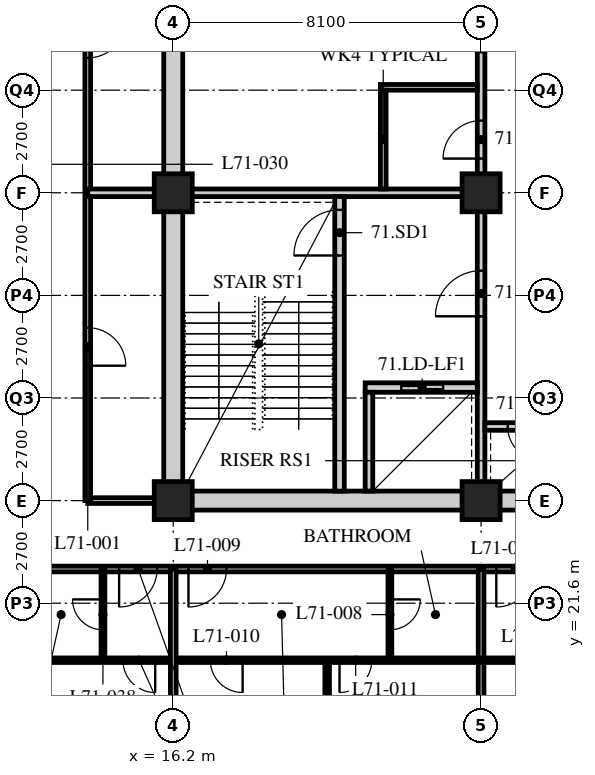
"""IFC4 building model, lengths in metres.
Left out: names, types, materials, properties, quantities, classifications, styles, units other than length and angle.
Written with IfcOpenShell. Run it as: python <this file> out.ifc"""

import sys

from ifc_helpers import new_model, si_unit, direction, frame, frame_2d, origin, origin_2d, place, context, subcontext, project, spatial, rectangle, hollow_rectangle, extrude, element, fill, save


model = new_model("IFC4")
c1 = context("Model", 3, precision=1e-05, world=origin(), true_north=direction((0.0, 1.0)))
c2 = subcontext(c1, "Body", "Model", "MODEL_VIEW")
j1 = project(units=[si_unit("LENGTHUNIT", "METRE"), si_unit("PLANEANGLEUNIT", "RADIAN")], contexts=[c1])
p1 = place(None, origin())
s1 = spatial("IfcSite", under=j1, at=p1, CompositionType="ELEMENT")
p2 = place(p1, origin())
s2 = spatial("IfcBuilding", under=s1, at=p2, CompositionType="ELEMENT")
p3 = place(p2, frame((0.0, 0.0, 277.5)))
s3 = spatial("IfcBuildingStorey", under=s2, at=p3, CompositionType="ELEMENT", Elevation=277.5)
for number, where, z_axis, x_axis in (
    (1, (16.2, 24.3, 0.0), (0.0, 0.0, 1.0), (1.0, 0.0, 0.0)),
    (2, (16.2, 32.4, 0.0), (0.0, 0.0, 1.0), (1.0, 0.0, 0.0)),
    (3, (24.3, 24.3, 0.0), (0.0, 0.0, 1.0), (1.0, 0.0, 0.0)),
    (4, (24.3, 32.4, 0.0), (0.0, 0.0, 1.0), (1.0, 0.0, 0.0)),
):
    element("IfcColumn", number, at=place(p3, frame(where, z_axis=z_axis, x_axis=x_axis)), inside=s3, PredefinedType="COLUMN", context=c2, shape_type="SweptSolid", body=[
        extrude(hollow_rectangle(XDim=1.0, YDim=1.0, WallThickness=0.1, at=origin_2d()), origin(), (0.0, 0.0, 1.0), 3.9),
    ])
p4 = place(p3, frame((12.15, 22.5, 0.0), z_axis=(0.0, 0.0, 1.0), x_axis=(1.0, 0.0, 0.0)))
e5 = element("IfcWall", 5, at=p4, inside=s3, PredefinedType="PARTITIONING", context=c2, shape_type="SweptSolid", body=[
    extrude(rectangle(XDim=24.3, YDim=0.15, at=frame_2d((12.15, 0.0))), origin(), (0.0, 0.0, 1.0), 3.69),
])
p5 = place(p4, frame((4.45, 0.0, 0.0)))
e6 = element("IfcOpeningElement", 6, at=p5, cuts=e5, PredefinedType="OPENING", context=c2, shape_type="SweptSolid", body=[
    extrude(rectangle(XDim=1.0, YDim=2.1, at=frame_2d((0.5, 1.05))), frame((0.0, 0.085, 0.0), z_axis=(0.0, -1.0, 0.0), x_axis=(1.0, 0.0, 0.0)), (0.0, 0.0, 1.0), 0.17),
])
p6 = place(p4, frame((12.55, 0.0, 0.0)))
e7 = element("IfcOpeningElement", 7, at=p6, cuts=e5, PredefinedType="OPENING", context=c2, shape_type="SweptSolid", body=[
    extrude(rectangle(XDim=1.0, YDim=2.1, at=frame_2d((0.5, 1.05))), frame((0.0, 0.085, 0.0), z_axis=(0.0, -1.0, 0.0), x_axis=(1.0, 0.0, 0.0)), (0.0, 0.0, 1.0), 0.17),
])
p7 = place(p4, frame((2.625, 0.0, 0.0)))
e8 = element("IfcOpeningElement", 8, at=p7, cuts=e5, PredefinedType="OPENING", context=c2, shape_type="SweptSolid", body=[
    extrude(rectangle(XDim=1.0, YDim=2.1, at=frame_2d((0.5, 1.05))), frame((0.0, 0.085, 0.0), z_axis=(0.0, -1.0, 0.0), x_axis=(1.0, 0.0, 0.0)), (0.0, 0.0, 1.0), 0.17),
])
p8 = place(p3, frame((16.0, 24.3, 0.0), z_axis=(0.0, 0.0, 1.0), x_axis=(-1.0, 0.0, 0.0)))
e9 = element("IfcWall", 9, at=p8, inside=s3, PredefinedType="PARTITIONING", context=c2, shape_type="SweptSolid", body=[
    extrude(rectangle(XDim=2.05, YDim=0.15, at=frame_2d((1.025, 0.0))), origin(), (0.0, 0.0, 1.0), 3.078),
])
p9 = place(p3, frame((13.95, 24.3, 0.0), z_axis=(0.0, 0.0, 1.0), x_axis=(0.0, 1.0, 0.0)))
e10 = element("IfcWall", 10, at=p9, inside=s3, PredefinedType="PARTITIONING", context=c2, shape_type="SweptSolid", body=[
    extrude(rectangle(XDim=26.55, YDim=0.15, at=frame_2d((13.275, 0.0))), origin(), (0.0, 0.0, 1.0), 3.69),
])
p10 = place(p9, frame((3.55, 0.0, 0.0)))
e11 = element("IfcOpeningElement", 11, at=p10, cuts=e10, PredefinedType="OPENING", context=c2, shape_type="SweptSolid", body=[
    extrude(rectangle(XDim=1.0, YDim=2.1, at=frame_2d((0.5, 1.05))), frame((0.0, 0.085, 0.0), z_axis=(0.0, -1.0, 0.0), x_axis=(1.0, 0.0, 0.0)), (0.0, 0.0, 1.0), 0.17),
])
p11 = place(p9, frame((11.65, 0.0, 0.0)))
e12 = element("IfcOpeningElement", 12, at=p11, cuts=e10, PredefinedType="OPENING", context=c2, shape_type="SweptSolid", body=[
    extrude(rectangle(XDim=1.0, YDim=2.1, at=frame_2d((0.5, 1.05))), frame((0.0, 0.085, 0.0), z_axis=(0.0, -1.0, 0.0), x_axis=(1.0, 0.0, 0.0)), (0.0, 0.0, 1.0), 0.17),
])
p12 = place(p3, frame((13.95, 32.4, 0.0), z_axis=(0.0, 0.0, 1.0), x_axis=(1.0, 0.0, 0.0)))
e13 = element("IfcWall", 13, at=p12, inside=s3, PredefinedType="SOLIDWALL", context=c2, shape_type="SweptSolid", body=[
    extrude(rectangle(XDim=2.25, YDim=0.2, at=frame_2d((1.125, 0.0))), origin(), (0.0, 0.0, 1.0), 3.078),
])
p13 = place(p3, frame((21.9, 22.5, 0.0), z_axis=(0.0, 0.0, 1.0), x_axis=(0.0, -1.0, 0.0)))
e14 = element("IfcWall", 14, at=p13, inside=s3, PredefinedType="PARTITIONING", context=c2, shape_type="SweptSolid", body=[
    extrude(rectangle(XDim=2.4, YDim=0.1, at=frame_2d((1.2, 0.0))), origin(), (0.0, 0.0, 1.0), 3.69),
])
p14 = place(p13, frame((0.8, 0.0, 0.0)))
e15 = element("IfcOpeningElement", 15, at=p14, cuts=e14, PredefinedType="OPENING", context=c2, shape_type="SweptSolid", body=[
    extrude(rectangle(XDim=0.8, YDim=2.1, at=frame_2d((0.4, 1.05))), frame((0.0, 0.06, 0.0), z_axis=(0.0, -1.0, 0.0), x_axis=(1.0, 0.0, 0.0)), (0.0, 0.0, 1.0), 0.12),
])
p15 = place(p3, frame((20.25, 20.1, 0.0), z_axis=(0.0, 0.0, 1.0), x_axis=(0.0, -1.0, 0.0)))
e16 = element("IfcWall", 16, at=p15, inside=s3, PredefinedType="PARTITIONING", context=c2, shape_type="SweptSolid", body=[
    extrude(rectangle(XDim=3.6, YDim=0.12, at=frame_2d((1.8, 0.0))), origin(), (0.0, 0.0, 1.0), 3.69),
])
p16 = place(p3, frame((24.3, 22.5, 0.0), z_axis=(0.0, 0.0, 1.0), x_axis=(0.0, -1.0, 0.0)))
e17 = element("IfcWall", 17, at=p16, inside=s3, PredefinedType="PARTITIONING", context=c2, shape_type="SweptSolid", body=[
    extrude(rectangle(XDim=6.0, YDim=0.15, at=frame_2d((3.0, 0.0))), origin(), (0.0, 0.0, 1.0), 3.078),
])
p17 = place(p3, frame((12.15, 20.1, 0.0), z_axis=(0.0, 0.0, 1.0), x_axis=(1.0, 0.0, 0.0)))
e18 = element("IfcWall", 18, at=p17, inside=s3, PredefinedType="PARTITIONING", context=c2, shape_type="SweptSolid", body=[
    extrude(rectangle(XDim=24.3, YDim=0.12, at=frame_2d((12.15, 0.0))), origin(), (0.0, 0.0, 1.0), 3.69),
])
p18 = place(p17, frame((5.025, 0.0, 0.0)))
e19 = element("IfcOpeningElement", 19, at=p18, cuts=e18, PredefinedType="OPENING", context=c2, shape_type="SweptSolid", body=[
    extrude(rectangle(XDim=0.85, YDim=2.1, at=frame_2d((0.425, 1.05))), frame((0.0, 0.07, 0.0), z_axis=(0.0, -1.0, 0.0), x_axis=(1.0, 0.0, 0.0)), (0.0, 0.0, 1.0), 0.14),
])
p19 = place(p17, frame((8.425, 0.0, 0.0)))
e20 = element("IfcOpeningElement", 20, at=p19, cuts=e18, PredefinedType="OPENING", context=c2, shape_type="SweptSolid", body=[
    extrude(rectangle(XDim=0.85, YDim=2.1, at=frame_2d((0.425, 1.05))), frame((0.0, 0.07, 0.0), z_axis=(0.0, -1.0, 0.0), x_axis=(1.0, 0.0, 0.0)), (0.0, 0.0, 1.0), 0.14),
])
p20 = place(p17, frame((13.125, 0.0, 0.0)))
e21 = element("IfcOpeningElement", 21, at=p20, cuts=e18, PredefinedType="OPENING", context=c2, shape_type="SweptSolid", body=[
    extrude(rectangle(XDim=0.85, YDim=2.1, at=frame_2d((0.425, 1.05))), frame((0.0, 0.07, 0.0), z_axis=(0.0, -1.0, 0.0), x_axis=(1.0, 0.0, 0.0)), (0.0, 0.0, 1.0), 0.14),
])
p21 = place(p17, frame((20.575, 0.0, 0.0)))
e22 = element("IfcOpeningElement", 22, at=p21, cuts=e18, PredefinedType="OPENING", context=c2, shape_type="SweptSolid", body=[
    extrude(rectangle(XDim=0.85, YDim=2.1, at=frame_2d((0.425, 1.05))), frame((0.0, 0.07, 0.0), z_axis=(0.0, -1.0, 0.0), x_axis=(1.0, 0.0, 0.0)), (0.0, 0.0, 1.0), 0.14),
])
p22 = place(p17, frame((2.725, 0.0, 0.0)))
e23 = element("IfcOpeningElement", 23, at=p22, cuts=e18, PredefinedType="OPENING", context=c2, shape_type="SweptSolid", body=[
    extrude(rectangle(XDim=0.85, YDim=2.1, at=frame_2d((0.425, 1.05))), frame((0.0, 0.07, 0.0), z_axis=(0.0, -1.0, 0.0), x_axis=(1.0, 0.0, 0.0)), (0.0, 0.0, 1.0), 0.14),
])
p23 = place(p3, frame((14.35, 22.5, 0.0), z_axis=(0.0, 0.0, 1.0), x_axis=(0.0, -1.0, 0.0)))
e24 = element("IfcWall", 24, at=p23, inside=s3, PredefinedType="PARTITIONING", context=c2, shape_type="SweptSolid", body=[
    extrude(rectangle(XDim=2.4, YDim=0.1, at=frame_2d((1.2, 0.0))), origin(), (0.0, 0.0, 1.0), 3.69),
])
p24 = place(p23, frame((0.8, 0.0, 0.0)))
e25 = element("IfcOpeningElement", 25, at=p24, cuts=e24, PredefinedType="OPENING", context=c2, shape_type="SweptSolid", body=[
    extrude(rectangle(XDim=0.8, YDim=2.1, at=frame_2d((0.4, 1.05))), frame((0.0, 0.06, 0.0), z_axis=(0.0, -1.0, 0.0), x_axis=(1.0, 0.0, 0.0)), (0.0, 0.0, 1.0), 0.12),
])
p25 = place(p3, frame((16.2, 22.5, 0.0), z_axis=(0.0, 0.0, 1.0), x_axis=(0.0, -1.0, 0.0)))
e26 = element("IfcWall", 26, at=p25, inside=s3, PredefinedType="PARTITIONING", context=c2, shape_type="SweptSolid", body=[
    extrude(rectangle(XDim=6.0, YDim=0.15, at=frame_2d((3.0, 0.0))), origin(), (0.0, 0.0, 1.0), 3.078),
])
p26 = place(p3, frame((15.95, 24.3, 0.0), z_axis=(0.0, 0.0, 1.0), x_axis=(1.0, 0.0, 0.0)))
e27 = element("IfcWall", 27, at=p26, inside=s3, PredefinedType="SOLIDWALL", context=c2, shape_type="SweptSolid", body=[
    extrude(rectangle(XDim=24.55, YDim=0.5, at=frame_2d((12.275, 0.0))), origin(), (0.0, 0.0, 1.0), 3.04),
])
p27 = place(p26, frame((11.5, 0.0, 0.0)))
e28 = element("IfcOpeningElement", 28, at=p27, cuts=e27, PredefinedType="OPENING", context=c2, shape_type="SweptSolid", body=[
    extrude(rectangle(XDim=1.8, YDim=2.4, at=frame_2d((0.9, 1.2))), frame((0.0, 0.26, 0.0), z_axis=(0.0, -1.0, 0.0), x_axis=(1.0, 0.0, 0.0)), (0.0, 0.0, 1.0), 0.52),
])
p28 = place(p3, frame((16.2, 24.55, 0.0), z_axis=(0.0, 0.0, 1.0), x_axis=(0.0, 1.0, 0.0)))
e29 = element("IfcWall", 29, at=p28, inside=s3, PredefinedType="SOLIDWALL", context=c2, shape_type="SweptSolid", body=[
    extrude(rectangle(XDim=15.7, YDim=0.5, at=frame_2d((7.85, 0.0))), origin(), (0.0, 0.0, 1.0), 3.078),
])
p29 = place(p3, frame((16.45, 32.4, 0.0), z_axis=(0.0, 0.0, 1.0), x_axis=(1.0, 0.0, 0.0)))
e30 = element("IfcWall", 30, at=p29, inside=s3, PredefinedType="SOLIDWALL", context=c2, shape_type="SweptSolid", body=[
    extrude(rectangle(XDim=7.95, YDim=0.2, at=frame_2d((3.975, 0.0))), origin(), (0.0, 0.0, 1.0), 3.078),
])
p30 = place(p3, frame((24.3, 24.55, 0.0), z_axis=(0.0, 0.0, 1.0), x_axis=(0.0, 1.0, 0.0)))
e31 = element("IfcWall", 31, at=p30, inside=s3, PredefinedType="SOLIDWALL", context=c2, shape_type="SweptSolid", body=[
    extrude(rectangle(XDim=7.75, YDim=0.2, at=frame_2d((3.875, 0.0))), origin(), (0.0, 0.0, 1.0), 3.078),
])
p31 = place(p30, frame((4.6, 0.0, 0.0)))
e32 = element("IfcOpeningElement", 32, at=p31, cuts=e31, PredefinedType="OPENING", context=c2, shape_type="SweptSolid", body=[
    extrude(rectangle(XDim=1.2, YDim=2.1, at=frame_2d((0.6, 1.05))), frame((0.0, 0.11, 0.0), z_axis=(0.0, -1.0, 0.0), x_axis=(1.0, 0.0, 0.0)), (0.0, 0.0, 1.0), 0.22),
])
p32 = place(p3, frame((20.575, 24.55, 0.0), z_axis=(0.0, 0.0, 1.0), x_axis=(0.0, 1.0, 0.0)))
e33 = element("IfcWall", 33, at=p32, inside=s3, PredefinedType="SOLIDWALL", context=c2, shape_type="SweptSolid", body=[
    extrude(rectangle(XDim=7.75, YDim=0.25, at=frame_2d((3.875, 0.0))), origin(), (0.0, 0.0, 1.0), 3.69),
])
p33 = place(p32, frame((6.2, 0.0, 0.0)))
e34 = element("IfcOpeningElement", 34, at=p33, cuts=e33, PredefinedType="OPENING", context=c2, shape_type="SweptSolid", body=[
    extrude(rectangle(XDim=1.2, YDim=2.1, at=frame_2d((0.6, 1.05))), frame((0.0, 0.135, 0.0), z_axis=(0.0, -1.0, 0.0), x_axis=(1.0, 0.0, 0.0)), (0.0, 0.0, 1.0), 0.27),
])
p34 = place(p3, frame((21.25, 27.275, 0.0), z_axis=(0.0, 0.0, 1.0), x_axis=(1.0, 0.0, 0.0)))
e35 = element("IfcWall", 35, at=p34, inside=s3, PredefinedType="SOLIDWALL", context=c2, shape_type="SweptSolid", body=[
    extrude(rectangle(XDim=2.95, YDim=0.25, at=frame_2d((1.475, 0.0))), origin(), (0.0, 0.0, 1.0), 3.69),
])
p35 = place(p34, frame((0.95, 0.0, 0.0)))
e36 = element("IfcOpeningElement", 36, at=p35, cuts=e35, PredefinedType="OPENING", context=c2, shape_type="SweptSolid", body=[
    extrude(rectangle(XDim=1.1, YDim=2.4, at=frame_2d((0.55, 1.2))), frame((0.0, 0.135, 0.0), z_axis=(0.0, -1.0, 0.0), x_axis=(1.0, 0.0, 0.0)), (0.0, 0.0, 1.0), 0.27),
])
p36 = place(p3, frame((21.35, 24.55, 0.0), z_axis=(0.0, 0.0, 1.0), x_axis=(0.0, 1.0, 0.0)))
e37 = element("IfcWall", 37, at=p36, inside=s3, PredefinedType="SOLIDWALL", context=c2, shape_type="SweptSolid", body=[
    extrude(rectangle(XDim=2.6, YDim=0.2, at=frame_2d((1.3, 0.0))), origin(), (0.0, 0.0, 1.0), 3.69),
])
p37 = place(p3, frame((24.4, 26.25, 0.0), z_axis=(0.0, 0.0, 1.0), x_axis=(1.0, 0.0, 0.0)))
e38 = element("IfcWall", 38, at=p37, inside=s3, PredefinedType="SOLIDWALL", context=c2, shape_type="SweptSolid", body=[
    extrude(rectangle(XDim=2.15, YDim=0.2, at=frame_2d((1.075, 0.0))), origin(), (0.0, 0.0, 1.0), 3.69),
])
p38 = place(p37, frame((0.6, 0.0, 0.0)))
e39 = element("IfcOpeningElement", 39, at=p38, cuts=e38, PredefinedType="OPENING", context=c2, shape_type="SweptSolid", body=[
    extrude(rectangle(XDim=0.9, YDim=2.1, at=frame_2d((0.45, 1.05))), frame((0.0, 0.11, 0.0), z_axis=(0.0, -1.0, 0.0), x_axis=(1.0, 0.0, 0.0)), (0.0, 0.0, 1.0), 0.22),
])
p39 = place(p3, frame((24.3, 32.5, 0.0), z_axis=(0.0, 0.0, 1.0), x_axis=(0.0, 1.0, 0.0)))
e40 = element("IfcWall", 40, at=p39, inside=s3, PredefinedType="PARTITIONING", context=c2, shape_type="SweptSolid", body=[
    extrude(rectangle(XDim=7.75, YDim=0.2, at=frame_2d((3.875, 0.0))), origin(), (0.0, 0.0, 1.0), 3.078),
])
p40 = place(p39, frame((0.8, 0.0, 0.0)))
e41 = element("IfcOpeningElement", 41, at=p40, cuts=e40, PredefinedType="OPENING", context=c2, shape_type="SweptSolid", body=[
    extrude(rectangle(XDim=1.0, YDim=2.1, at=frame_2d((0.5, 1.05))), frame((0.0, 0.11, 0.0), z_axis=(0.0, -1.0, 0.0), x_axis=(1.0, 0.0, 0.0)), (0.0, 0.0, 1.0), 0.22),
])
p41 = place(p39, frame((3.6, 0.0, 0.0)))
e42 = element("IfcOpeningElement", 42, at=p41, cuts=e40, PredefinedType="OPENING", context=c2, shape_type="SweptSolid", body=[
    extrude(rectangle(XDim=0.9, YDim=2.1, at=frame_2d((0.45, 1.05))), frame((0.0, 0.11, 0.0), z_axis=(0.0, -1.0, 0.0), x_axis=(1.0, 0.0, 0.0)), (0.0, 0.0, 1.0), 0.22),
])
p42 = place(p39, frame((6.175, 0.0, 0.0)))
e43 = element("IfcOpeningElement", 43, at=p42, cuts=e40, PredefinedType="OPENING", context=c2, shape_type="SweptSolid", body=[
    extrude(rectangle(XDim=0.9, YDim=2.1, at=frame_2d((0.45, 1.05))), frame((0.0, 0.11, 0.0), z_axis=(0.0, -1.0, 0.0), x_axis=(1.0, 0.0, 0.0)), (0.0, 0.0, 1.0), 0.22),
])
p43 = place(p3, frame((21.65, 35.175, 0.0), z_axis=(0.0, 0.0, 1.0), x_axis=(1.0, 0.0, 0.0)))
e44 = element("IfcWall", 44, at=p43, inside=s3, PredefinedType="PARTITIONING", context=c2, shape_type="SweptSolid", body=[
    extrude(rectangle(XDim=2.55, YDim=0.15, at=frame_2d((1.275, 0.0))), origin(), (0.0, 0.0, 1.0), 3.69),
])
p44 = place(p3, frame((21.725, 32.5, 0.0), z_axis=(0.0, 0.0, 1.0), x_axis=(0.0, 1.0, 0.0)))
e45 = element("IfcWall", 45, at=p44, inside=s3, PredefinedType="PARTITIONING", context=c2, shape_type="SweptSolid", body=[
    extrude(rectangle(XDim=2.6, YDim=0.15, at=frame_2d((1.3, 0.0))), origin(), (0.0, 0.0, 1.0), 3.69),
])
p45 = place(p10, origin())
e46 = element("IfcDoor", 46, at=p45, inside=s3, OperationType="SINGLE_SWING_RIGHT", PredefinedType="DOOR", context=c2, shape_type="SweptSolid", body=[
    extrude(rectangle(XDim=1.0, YDim=2.1, at=frame_2d((0.5, 1.05))), frame((0.0, 0.025, 0.0), z_axis=(0.0, -1.0, 0.0), x_axis=(1.0, 0.0, 0.0)), (0.0, 0.0, 1.0), 0.05),
])
fill(e11, e46)
p46 = place(p11, origin())
e47 = element("IfcDoor", 47, at=p46, inside=s3, OperationType="SINGLE_SWING_LEFT", PredefinedType="DOOR", context=c2, shape_type="SweptSolid", body=[
    extrude(rectangle(XDim=1.0, YDim=2.1, at=frame_2d((0.5, 1.05))), frame((0.0, 0.025, 0.0), z_axis=(0.0, -1.0, 0.0), x_axis=(1.0, 0.0, 0.0)), (0.0, 0.0, 1.0), 0.05),
])
fill(e12, e47)
p47 = place(p14, origin())
e48 = element("IfcDoor", 48, at=p47, inside=s3, OperationType="SINGLE_SWING_LEFT", PredefinedType="DOOR", context=c2, shape_type="SweptSolid", body=[
    extrude(rectangle(XDim=0.8, YDim=2.1, at=frame_2d((0.4, 1.05))), frame((0.0, 0.025, 0.0), z_axis=(0.0, -1.0, 0.0), x_axis=(1.0, 0.0, 0.0)), (0.0, 0.0, 1.0), 0.05),
])
fill(e15, e48)
p48 = place(p5, origin())
e49 = element("IfcDoor", 49, at=p48, inside=s3, OperationType="SINGLE_SWING_RIGHT", PredefinedType="DOOR", context=c2, shape_type="SweptSolid", body=[
    extrude(rectangle(XDim=1.0, YDim=2.1, at=frame_2d((0.5, 1.05))), frame((0.0, 0.025, 0.0), z_axis=(0.0, -1.0, 0.0), x_axis=(1.0, 0.0, 0.0)), (0.0, 0.0, 1.0), 0.05),
])
fill(e6, e49)
p49 = place(p18, origin())
e50 = element("IfcDoor", 50, at=p49, inside=s3, OperationType="SINGLE_SWING_LEFT", PredefinedType="DOOR", context=c2, shape_type="SweptSolid", body=[
    extrude(rectangle(XDim=0.85, YDim=2.1, at=frame_2d((0.425, 1.05))), frame((0.0, 0.025, 0.0), z_axis=(0.0, -1.0, 0.0), x_axis=(1.0, 0.0, 0.0)), (0.0, 0.0, 1.0), 0.05),
])
fill(e19, e50)
p50 = place(p19, origin())
e51 = element("IfcDoor", 51, at=p50, inside=s3, OperationType="SINGLE_SWING_RIGHT", PredefinedType="DOOR", context=c2, shape_type="SweptSolid", body=[
    extrude(rectangle(XDim=0.85, YDim=2.1, at=frame_2d((0.425, 1.05))), frame((0.0, 0.025, 0.0), z_axis=(0.0, -1.0, 0.0), x_axis=(1.0, 0.0, 0.0)), (0.0, 0.0, 1.0), 0.05),
])
fill(e20, e51)
p51 = place(p6, origin())
e52 = element("IfcDoor", 52, at=p51, inside=s3, OperationType="SINGLE_SWING_RIGHT", PredefinedType="DOOR", context=c2, shape_type="SweptSolid", body=[
    extrude(rectangle(XDim=1.0, YDim=2.1, at=frame_2d((0.5, 1.05))), frame((0.0, 0.025, 0.0), z_axis=(0.0, -1.0, 0.0), x_axis=(1.0, 0.0, 0.0)), (0.0, 0.0, 1.0), 0.05),
])
fill(e7, e52)
p52 = place(p24, origin())
e53 = element("IfcDoor", 53, at=p52, inside=s3, OperationType="SINGLE_SWING_RIGHT", PredefinedType="DOOR", context=c2, shape_type="SweptSolid", body=[
    extrude(rectangle(XDim=0.8, YDim=2.1, at=frame_2d((0.4, 1.05))), frame((0.0, 0.025, 0.0), z_axis=(0.0, -1.0, 0.0), x_axis=(1.0, 0.0, 0.0)), (0.0, 0.0, 1.0), 0.05),
])
fill(e25, e53)
p53 = place(p7, origin())
e54 = element("IfcDoor", 54, at=p53, inside=s3, OperationType="SINGLE_SWING_RIGHT", PredefinedType="DOOR", context=c2, shape_type="SweptSolid", body=[
    extrude(rectangle(XDim=1.0, YDim=2.1, at=frame_2d((0.5, 1.05))), frame((0.0, 0.025, 0.0), z_axis=(0.0, -1.0, 0.0), x_axis=(1.0, 0.0, 0.0)), (0.0, 0.0, 1.0), 0.05),
])
fill(e8, e54)
p54 = place(p22, origin())
e55 = element("IfcDoor", 55, at=p54, inside=s3, OperationType="SINGLE_SWING_LEFT", PredefinedType="DOOR", context=c2, shape_type="SweptSolid", body=[
    extrude(rectangle(XDim=0.85, YDim=2.1, at=frame_2d((0.425, 1.05))), frame((0.0, 0.025, 0.0), z_axis=(0.0, -1.0, 0.0), x_axis=(1.0, 0.0, 0.0)), (0.0, 0.0, 1.0), 0.05),
])
fill(e23, e55)
p55 = place(p40, origin())
e56 = element("IfcDoor", 56, at=p55, inside=s3, OperationType="SINGLE_SWING_LEFT", PredefinedType="DOOR", context=c2, shape_type="SweptSolid", body=[
    extrude(rectangle(XDim=1.0, YDim=2.1, at=frame_2d((0.5, 1.05))), frame((0.0, 0.025, 0.0), z_axis=(0.0, -1.0, 0.0), x_axis=(1.0, 0.0, 0.0)), (0.0, 0.0, 1.0), 0.05),
])
fill(e41, e56)
p56 = place(p33, origin())
e57 = element("IfcDoor", 57, at=p56, inside=s3, OperationType="SINGLE_SWING_LEFT", PredefinedType="DOOR", context=c2, shape_type="SweptSolid", body=[
    extrude(rectangle(XDim=1.2, YDim=2.1, at=frame_2d((0.6, 1.05))), frame((0.0, 0.025, 0.0), z_axis=(0.0, -1.0, 0.0), x_axis=(1.0, 0.0, 0.0)), (0.0, 0.0, 1.0), 0.05),
])
fill(e34, e57)
p57 = place(p31, origin())
e58 = element("IfcDoor", 58, at=p57, inside=s3, OperationType="SINGLE_SWING_LEFT", PredefinedType="DOOR", context=c2, shape_type="SweptSolid", body=[
    extrude(rectangle(XDim=1.2, YDim=2.1, at=frame_2d((0.6, 1.05))), frame((0.0, 0.025, 0.0), z_axis=(0.0, -1.0, 0.0), x_axis=(1.0, 0.0, 0.0)), (0.0, 0.0, 1.0), 0.05),
])
fill(e32, e58)
p58 = place(p38, origin())
e59 = element("IfcDoor", 59, at=p58, inside=s3, OperationType="SINGLE_SWING_LEFT", PredefinedType="DOOR", context=c2, shape_type="SweptSolid", body=[
    extrude(rectangle(XDim=0.9, YDim=2.1, at=frame_2d((0.45, 1.05))), frame((0.0, 0.025, 0.0), z_axis=(0.0, -1.0, 0.0), x_axis=(1.0, 0.0, 0.0)), (0.0, 0.0, 1.0), 0.05),
])
fill(e39, e59)
p59 = place(p35, origin())
e60 = element("IfcDoor", 60, at=p59, inside=s3, OperationType="DOUBLE_DOOR_SLIDING", PredefinedType="DOOR", context=c2, shape_type="SweptSolid", body=[
    extrude(rectangle(XDim=1.1, YDim=2.4, at=frame_2d((0.55, 1.2))), frame((0.0, 0.025, 0.0), z_axis=(0.0, -1.0, 0.0), x_axis=(1.0, 0.0, 0.0)), (0.0, 0.0, 1.0), 0.05),
])
fill(e36, e60)
save(model, sys.argv[1])
